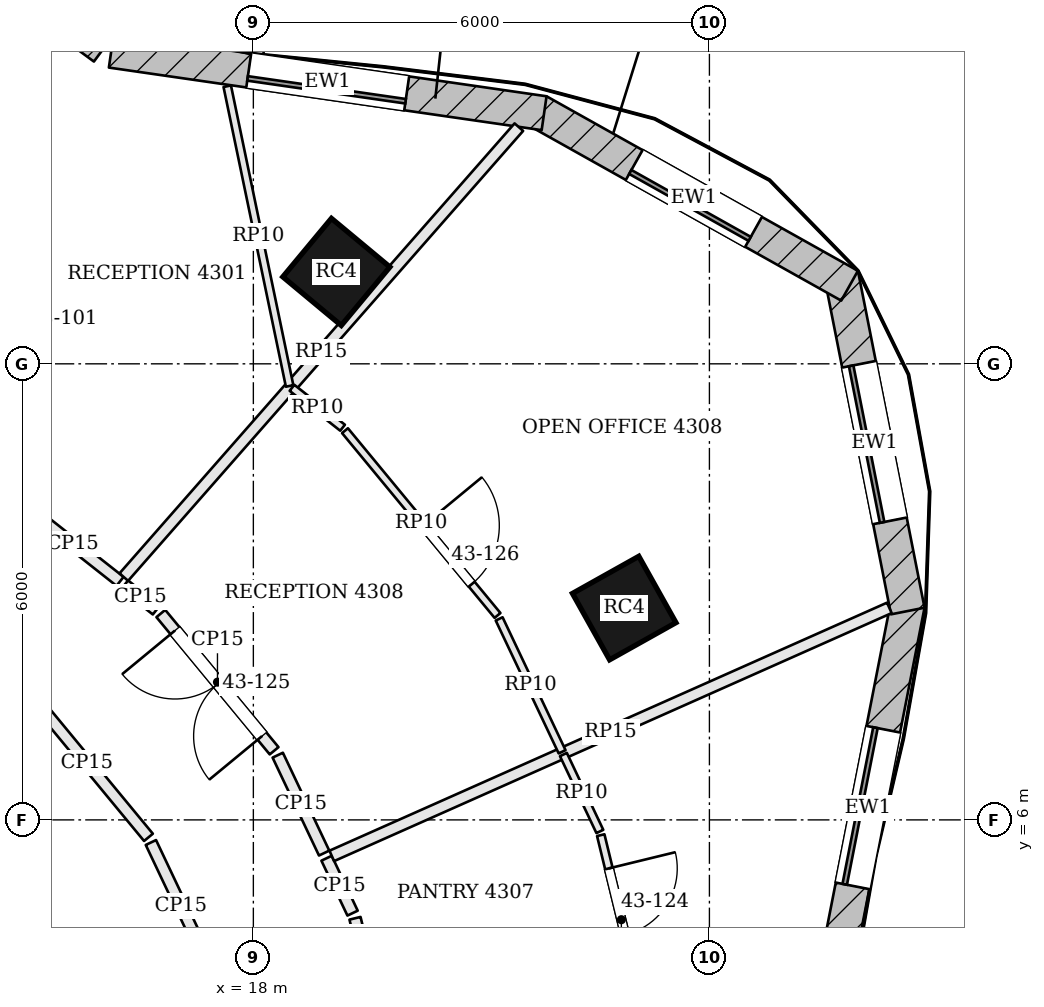
"""IFC4 building model, lengths in metres.
Left out: names, types, materials, properties, quantities, classifications, styles, units other than length and angle.
Written with IfcOpenShell. Run it as: python <this file> out.ifc"""

import sys

from ifc_helpers import new_model, si_unit, direction, frame, frame_2d, origin, origin_2d, place, context, subcontext, project, spatial, rectangle, extrude, element, fill, save


model = new_model("IFC4")
c1 = context("Model", 3, precision=1e-05, world=origin(), true_north=direction((0.0, 1.0)))
c2 = subcontext(c1, "Body", "Model", "MODEL_VIEW")
j1 = project(units=[si_unit("LENGTHUNIT", "METRE"), si_unit("PLANEANGLEUNIT", "RADIAN")], contexts=[c1])
p1 = place(None, origin())
s1 = spatial("IfcSite", under=j1, at=p1, CompositionType="ELEMENT")
p2 = place(p1, origin())
s2 = spatial("IfcBuilding", under=s1, at=p2, CompositionType="ELEMENT")
p3 = place(p2, frame((0.0, 0.0, 177.9)))
s3 = spatial("IfcBuildingStorey", under=s2, at=p3, CompositionType="ELEMENT", Elevation=177.9)
for number, where, z_axis, x_axis in (
    (1, (22.879, 8.787, 0.0), (0.0, 0.0, 1.0), (-0.489, 0.873, 0.0)),
    (2, (19.092, 13.209, 0.0), (0.0, 0.0, 1.0), (-0.769, 0.639, 0.0)),
):
    element("IfcColumn", number, at=place(p3, frame(where, z_axis=z_axis, x_axis=x_axis)), inside=s3, PredefinedType="COLUMN", context=c2, shape_type="SweptSolid", body=[
        extrude(rectangle(XDim=1.0, YDim=1.0, at=origin_2d()), origin(), (0.0, 0.0, 1.0), 3.9),
    ])
p4 = place(p3, frame((25.561, 3.49, 0.0), z_axis=(0.0, 0.0, 1.0), x_axis=(0.192494026297, 0.981298145234, 0.0)))
e3 = element("IfcWall", 3, at=p4, inside=s3, PredefinedType="SOLIDWALL", context=c2, shape_type="SweptSolid", body=[
    extrude(rectangle(XDim=5.446, YDim=0.45, at=frame_2d((2.723, 0.0))), origin(), (0.0, 0.0, 1.0), 3.7),
])
p5 = place(p4, frame((1.673, 0.0, 0.9)))
e4 = element("IfcOpeningElement", 4, at=p5, cuts=e3, PredefinedType="OPENING", context=c2, shape_type="SweptSolid", body=[
    extrude(rectangle(XDim=2.1, YDim=2.3, at=frame_2d((1.05, 1.15))), frame((0.0, 0.235, 0.0), z_axis=(0.0, -1.0, 0.0), x_axis=(1.0, 0.0, 0.0)), (0.0, 0.0, 1.0), 0.47),
])
p6 = place(p3, frame((26.61, 8.748, 0.0), z_axis=(0.0, 0.0, 1.0), x_axis=(-0.193923166402, 0.981016720312, 0.0)))
e5 = element("IfcWall", 5, at=p6, inside=s3, PredefinedType="SOLIDWALL", context=c2, shape_type="SweptSolid", body=[
    extrude(rectangle(XDim=4.518, YDim=0.45, at=frame_2d((2.259, 0.0))), origin(), (0.0, 0.0, 1.0), 3.7),
])
p7 = place(p6, frame((1.209, 0.0, 0.9)))
e6 = element("IfcOpeningElement", 6, at=p7, cuts=e5, PredefinedType="OPENING", context=c2, shape_type="SweptSolid", body=[
    extrude(rectangle(XDim=2.1, YDim=2.3, at=frame_2d((1.05, 1.15))), frame((0.0, 0.235, 0.0), z_axis=(0.0, -1.0, 0.0), x_axis=(1.0, 0.0, 0.0)), (0.0, 0.0, 1.0), 0.47),
])
p8 = place(p3, frame((25.844, 13.028, 0.0), z_axis=(0.0, 0.0, 1.0), x_axis=(-0.872346398261, 0.488888291373, 0.0)))
e7 = element("IfcWall", 7, at=p8, inside=s3, PredefinedType="SOLIDWALL", context=c2, shape_type="SweptSolid", body=[
    extrude(rectangle(XDim=4.696, YDim=0.45, at=frame_2d((2.348, 0.0))), origin(), (0.0, 0.0, 1.0), 3.7),
])
p9 = place(p8, frame((1.448, 0.0, 0.9)))
e8 = element("IfcOpeningElement", 8, at=p9, cuts=e7, PredefinedType="OPENING", context=c2, shape_type="SweptSolid", body=[
    extrude(rectangle(XDim=1.8, YDim=2.3, at=frame_2d((0.9, 1.15))), frame((0.0, 0.235, 0.0), z_axis=(0.0, -1.0, 0.0), x_axis=(1.0, 0.0, 0.0)), (0.0, 0.0, 1.0), 0.47),
])
p10 = place(p3, frame((21.825, 15.297, 0.0), z_axis=(0.0, 0.0, 1.0), x_axis=(-0.98971474215, 0.143054986527, 0.0)))
e9 = element("IfcWall", 9, at=p10, inside=s3, PredefinedType="SOLIDWALL", context=c2, shape_type="SweptSolid", body=[
    extrude(rectangle(XDim=5.753, YDim=0.45, at=frame_2d((2.876, 0.0))), origin(), (0.0, 0.0, 1.0), 3.7),
])
p11 = place(p10, frame((1.826, 0.0, 0.9)))
e10 = element("IfcOpeningElement", 10, at=p11, cuts=e9, PredefinedType="OPENING", context=c2, shape_type="SweptSolid", body=[
    extrude(rectangle(XDim=2.1, YDim=2.3, at=frame_2d((1.05, 1.15))), frame((0.0, 0.235, 0.0), z_axis=(0.0, -1.0, 0.0), x_axis=(1.0, 0.0, 0.0)), (0.0, 0.0, 1.0), 0.47),
])
p12 = place(p3, frame((16.036, 16.158, 0.0), z_axis=(0.0, 0.0, 1.0), x_axis=(-0.805181432967, 0.593028549064, 0.0)))
e11 = element("IfcWall", 11, at=p12, inside=s3, PredefinedType="SOLIDWALL", context=c2, shape_type="SweptSolid", body=[
    extrude(rectangle(XDim=3.469, YDim=0.45, at=frame_2d((1.734, 0.0))), origin(), (0.0, 0.0, 1.0), 3.7),
])
p13 = place(p12, frame((0.684, 0.0, 0.9)))
e12 = element("IfcOpeningElement", 12, at=p13, cuts=e11, PredefinedType="OPENING", context=c2, shape_type="SweptSolid", body=[
    extrude(rectangle(XDim=2.1, YDim=2.3, at=frame_2d((1.05, 1.15))), frame((0.0, 0.235, 0.0), z_axis=(0.0, -1.0, 0.0), x_axis=(1.0, 0.0, 0.0)), (0.0, 0.0, 1.0), 0.47),
])
p14 = place(p3, frame((16.246, 9.138, 0.0), z_axis=(0.0, 0.0, 1.0), x_axis=(-0.785126783061, 0.619335074512, 0.0)))
e13 = element("IfcWall", 13, at=p14, inside=s3, PredefinedType="PARTITIONING", context=c2, shape_type="SweptSolid", body=[
    extrude(rectangle(XDim=1.587, YDim=0.15, at=frame_2d((0.794, 0.0))), origin(), (0.0, 0.0, 1.0), 3.084),
])
p15 = place(p3, frame((21.493, 15.114, 0.0), z_axis=(0.0, 0.0, 1.0), x_axis=(-0.659778549164, -0.751460089467, 0.0)))
e14 = element("IfcWall", 14, at=p15, inside=s3, PredefinedType="PARTITIONING", context=c2, shape_type="SweptSolid", body=[
    extrude(rectangle(XDim=7.877, YDim=0.15, at=frame_2d((3.938, 0.0))), origin(), (0.0, 0.0, 1.0), 3.234),
])
p16 = place(p3, frame((19.722, 3.125, 0.0), z_axis=(0.0, 0.0, 1.0), x_axis=(-0.236703930685, 0.971581828359, 0.0)))
e15 = element("IfcWall", 15, at=p16, inside=s3, PredefinedType="PARTITIONING", context=c2, shape_type="SweptSolid", body=[
    extrude(rectangle(XDim=1.626, YDim=0.15, at=frame_2d((0.813, 0.0))), origin(), (0.0, 0.0, 1.0), 3.084),
])
p17 = place(p16, frame((0.35, 0.0, 0.0)))
e16 = element("IfcOpeningElement", 16, at=p17, cuts=e15, PredefinedType="OPENING", context=c2, shape_type="SweptSolid", body=[
    extrude(rectangle(XDim=0.9, YDim=2.1, at=frame_2d((0.45, 1.05))), frame((0.0, 0.085, 0.0), z_axis=(0.0, -1.0, 0.0), x_axis=(1.0, 0.0, 0.0)), (0.0, 0.0, 1.0), 0.17),
])
p18 = place(p3, frame((19.305, 4.773, 0.0), z_axis=(0.0, 0.0, 1.0), x_axis=(-0.428296443676, 0.90363828844, 0.0)))
e17 = element("IfcWall", 17, at=p18, inside=s3, PredefinedType="PARTITIONING", context=c2, shape_type="SweptSolid", body=[
    extrude(rectangle(XDim=0.799, YDim=0.15, at=frame_2d((0.399, 0.0))), origin(), (0.0, 0.0, 1.0), 3.084),
])
p19 = place(p3, frame((26.367, 8.789, 0.0), z_axis=(0.0, 0.0, 1.0), x_axis=(-0.913673557468, -0.406448804137, 0.0)))
e18 = element("IfcWall", 18, at=p19, inside=s3, PredefinedType="PARTITIONING", context=c2, shape_type="SweptSolid", body=[
    extrude(rectangle(XDim=8.029, YDim=0.15, at=frame_2d((4.014, 0.0))), origin(), (0.0, 0.0, 1.0), 3.234),
])
p20 = place(p3, frame((18.931, 5.563, 0.0), z_axis=(0.0, 0.0, 1.0), x_axis=(-0.428204145682, 0.903682029046, 0.0)))
e19 = element("IfcWall", 19, at=p20, inside=s3, PredefinedType="PARTITIONING", context=c2, shape_type="SweptSolid", body=[
    extrude(rectangle(XDim=1.425, YDim=0.15, at=frame_2d((0.713, 0.0))), origin(), (0.0, 0.0, 1.0), 3.084),
])
p21 = place(p3, frame((18.273, 6.909, 0.0), z_axis=(0.0, 0.0, 1.0), x_axis=(-0.63653648943, 0.771246586783, 0.0)))
e20 = element("IfcWall", 20, at=p21, inside=s3, PredefinedType="PARTITIONING", context=c2, shape_type="SweptSolid", body=[
    extrude(rectangle(XDim=2.342, YDim=0.15, at=frame_2d((1.171, 0.0))), origin(), (0.0, 0.0, 1.0), 3.084),
])
p22 = place(p21, frame((0.25, 0.0, 0.0)))
e21 = element("IfcOpeningElement", 21, at=p22, cuts=e20, PredefinedType="OPENING", context=c2, shape_type="SweptSolid", body=[
    extrude(rectangle(XDim=1.8, YDim=2.1, at=frame_2d((0.9, 1.05))), frame((0.0, 0.085, 0.0), z_axis=(0.0, -1.0, 0.0), x_axis=(1.0, 0.0, 0.0)), (0.0, 0.0, 1.0), 0.17),
])
p23 = place(p3, frame((16.724, 8.761, 0.0), z_axis=(0.0, 0.0, 1.0), x_axis=(-0.785093642841, 0.619377083827, 0.0)))
e22 = element("IfcWall", 22, at=p23, inside=s3, PredefinedType="PARTITIONING", context=c2, shape_type="SweptSolid", body=[
    extrude(rectangle(XDim=0.533, YDim=0.15, at=frame_2d((0.267, 0.0))), origin(), (0.0, 0.0, 1.0), 3.084),
])
p24 = place(p3, frame((15.0, 7.733, 0.0), z_axis=(0.0, 0.0, 1.0), x_axis=(0.636601263488, -0.771193121938, 0.0)))
e23 = element("IfcWall", 23, at=p24, inside=s3, PredefinedType="PARTITIONING", context=c2, shape_type="SweptSolid", body=[
    extrude(rectangle(XDim=2.545, YDim=0.15, at=frame_2d((1.272, 0.0))), origin(), (0.0, 0.0, 1.0), 3.084),
])
p25 = place(p3, frame((16.652, 5.702, 0.0), z_axis=(0.0, 0.0, 1.0), x_axis=(0.428126129773, -0.903718992279, 0.0)))
e24 = element("IfcWall", 24, at=p25, inside=s3, PredefinedType="PARTITIONING", context=c2, shape_type="SweptSolid", body=[
    extrude(rectangle(XDim=1.846, YDim=0.15, at=frame_2d((0.923, 0.0))), origin(), (0.0, 0.0, 1.0), 3.084),
])
p26 = place(p3, frame((17.656, 15.652, 0.0), z_axis=(0.0, 0.0, 1.0), x_axis=(0.203733969948, -0.979026286414, 0.0)))
e25 = element("IfcWall", 25, at=p26, inside=s3, PredefinedType="PARTITIONING", context=c2, shape_type="SweptSolid", body=[
    extrude(rectangle(XDim=4.028, YDim=0.1, at=frame_2d((2.014, 0.0))), origin(), (0.0, 0.0, 1.0), 3.084),
])
p27 = place(p3, frame((22.079, 6.86, 0.0), z_axis=(0.0, 0.0, 1.0), x_axis=(0.428105084675, -0.903728961844, 0.0)))
e26 = element("IfcWall", 26, at=p27, inside=s3, PredefinedType="PARTITIONING", context=c2, shape_type="SweptSolid", body=[
    extrude(rectangle(XDim=1.12, YDim=0.1, at=frame_2d((0.56, 0.0))), origin(), (0.0, 0.0, 1.0), 3.084),
])
p28 = place(p3, frame((22.57, 5.799, 0.0), z_axis=(0.0, 0.0, 1.0), x_axis=(0.236811358433, -0.971555649727, 0.0)))
e27 = element("IfcWall", 27, at=p28, inside=s3, PredefinedType="PARTITIONING", context=c2, shape_type="SweptSolid", body=[
    extrude(rectangle(XDim=2.29, YDim=0.1, at=frame_2d((1.145, 0.0))), origin(), (0.0, 0.0, 1.0), 3.084),
])
p29 = place(p28, frame((0.45, 0.0, 0.0)))
e28 = element("IfcOpeningElement", 28, at=p29, cuts=e27, PredefinedType="OPENING", context=c2, shape_type="SweptSolid", body=[
    extrude(rectangle(XDim=0.9, YDim=2.1, at=frame_2d((0.45, 1.05))), frame((0.0, 0.06, 0.0), z_axis=(0.0, -1.0, 0.0), x_axis=(1.0, 0.0, 0.0)), (0.0, 0.0, 1.0), 0.12),
])
p30 = place(p3, frame((18.508, 11.684, 0.0), z_axis=(0.0, 0.0, 1.0), x_axis=(0.785067093858, -0.619410734603, 0.0)))
e29 = element("IfcWall", 29, at=p30, inside=s3, PredefinedType="PARTITIONING", context=c2, shape_type="SweptSolid", body=[
    extrude(rectangle(XDim=0.847, YDim=0.1, at=frame_2d((0.424, 0.0))), origin(), (0.0, 0.0, 1.0), 3.084),
])
p31 = place(p3, frame((19.206, 11.121, 0.0), z_axis=(0.0, 0.0, 1.0), x_axis=(0.636597206989, -0.771196470462, 0.0)))
e30 = element("IfcWall", 30, at=p31, inside=s3, PredefinedType="PARTITIONING", context=c2, shape_type="SweptSolid", body=[
    extrude(rectangle(XDim=3.152, YDim=0.1, at=frame_2d((1.576, 0.0))), origin(), (0.0, 0.0, 1.0), 3.084),
])
p32 = place(p31, frame((1.619, 0.0, 0.0)))
e31 = element("IfcOpeningElement", 31, at=p32, cuts=e30, PredefinedType="OPENING", context=c2, shape_type="SweptSolid", body=[
    extrude(rectangle(XDim=1.0, YDim=2.1, at=frame_2d((0.5, 1.05))), frame((0.0, 0.06, 0.0), z_axis=(0.0, -1.0, 0.0), x_axis=(1.0, 0.0, 0.0)), (0.0, 0.0, 1.0), 0.12),
])
p33 = place(p3, frame((21.234, 8.644, 0.0), z_axis=(0.0, 0.0, 1.0), x_axis=(0.428183987328, -0.903691580682, 0.0)))
e32 = element("IfcWall", 32, at=p33, inside=s3, PredefinedType="PARTITIONING", context=c2, shape_type="SweptSolid", body=[
    extrude(rectangle(XDim=1.935, YDim=0.1, at=frame_2d((0.967, 0.0))), origin(), (0.0, 0.0, 1.0), 3.084),
])
p34 = place(p5, origin())
e33 = element("IfcWindow", 33, at=p34, inside=s3, PartitioningType="SINGLE_PANEL", PredefinedType="WINDOW", context=c2, shape_type="SweptSolid", body=[
    extrude(rectangle(XDim=2.1, YDim=2.3, at=frame_2d((1.05, 1.15))), frame((0.0, 0.135, 0.0), z_axis=(0.0, -1.0, 0.0), x_axis=(1.0, 0.0, 0.0)), (0.0, 0.0, 1.0), 0.06),
])
fill(e4, e33)
p35 = place(p7, origin())
e34 = element("IfcWindow", 34, at=p35, inside=s3, PartitioningType="SINGLE_PANEL", PredefinedType="WINDOW", context=c2, shape_type="SweptSolid", body=[
    extrude(rectangle(XDim=2.1, YDim=2.3, at=frame_2d((1.05, 1.15))), frame((0.0, 0.135, 0.0), z_axis=(0.0, -1.0, 0.0), x_axis=(1.0, 0.0, 0.0)), (0.0, 0.0, 1.0), 0.06),
])
fill(e6, e34)
p36 = place(p9, origin())
e35 = element("IfcWindow", 35, at=p36, inside=s3, PartitioningType="SINGLE_PANEL", PredefinedType="WINDOW", context=c2, shape_type="SweptSolid", body=[
    extrude(rectangle(XDim=1.8, YDim=2.3, at=frame_2d((0.9, 1.15))), frame((0.0, 0.135, 0.0), z_axis=(0.0, -1.0, 0.0), x_axis=(1.0, 0.0, 0.0)), (0.0, 0.0, 1.0), 0.06),
])
fill(e8, e35)
p37 = place(p11, origin())
e36 = element("IfcWindow", 36, at=p37, inside=s3, PartitioningType="SINGLE_PANEL", PredefinedType="WINDOW", context=c2, shape_type="SweptSolid", body=[
    extrude(rectangle(XDim=2.1, YDim=2.3, at=frame_2d((1.05, 1.15))), frame((0.0, 0.135, 0.0), z_axis=(0.0, -1.0, 0.0), x_axis=(1.0, 0.0, 0.0)), (0.0, 0.0, 1.0), 0.06),
])
fill(e10, e36)
p38 = place(p29, origin())
e37 = element("IfcDoor", 37, at=p38, inside=s3, OperationType="SINGLE_SWING_LEFT", PredefinedType="DOOR", context=c2, shape_type="SweptSolid", body=[
    extrude(rectangle(XDim=0.9, YDim=2.1, at=frame_2d((0.45, 1.05))), frame((0.0, 0.025, 0.0), z_axis=(0.0, -1.0, 0.0), x_axis=(1.0, 0.0, 0.0)), (0.0, 0.0, 1.0), 0.05),
])
fill(e28, e37)
p39 = place(p22, origin())
e38 = element("IfcDoor", 38, at=p39, inside=s3, OperationType="DOUBLE_DOOR_SINGLE_SWING", PredefinedType="DOOR", context=c2, shape_type="SweptSolid", body=[
    extrude(rectangle(XDim=1.8, YDim=2.1, at=frame_2d((0.9, 1.05))), frame((0.0, 0.025, 0.0), z_axis=(0.0, -1.0, 0.0), x_axis=(1.0, 0.0, 0.0)), (0.0, 0.0, 1.0), 0.05),
])
fill(e21, e38)
p40 = place(p32, origin())
e39 = element("IfcDoor", 39, at=p40, inside=s3, OperationType="SINGLE_SWING_LEFT", PredefinedType="DOOR", context=c2, shape_type="SweptSolid", body=[
    extrude(rectangle(XDim=1.0, YDim=2.1, at=frame_2d((0.5, 1.05))), frame((0.0, 0.025, 0.0), z_axis=(0.0, -1.0, 0.0), x_axis=(1.0, 0.0, 0.0)), (0.0, 0.0, 1.0), 0.05),
])
fill(e31, e39)
save(model, sys.argv[1])
